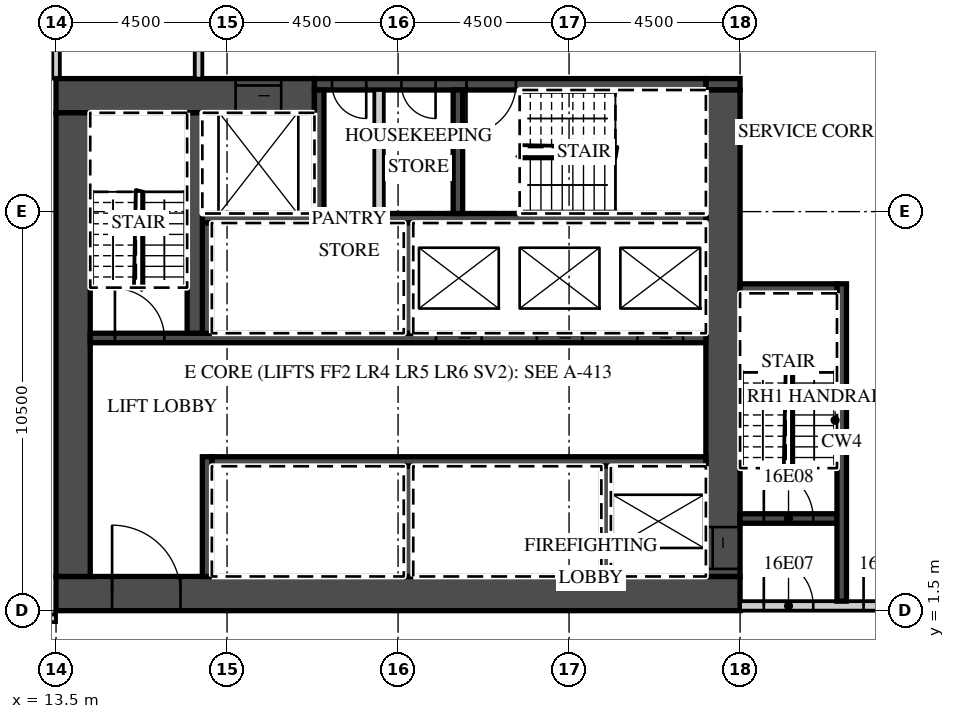
"""IFC4 building model, lengths in metres.
Left out: names, types, materials, properties, quantities, classifications, styles, units other than length and angle.
Written with IfcOpenShell. Run it as: python <this file> out.ifc"""

import sys

from ifc_helpers import new_model, si_unit, direction, frame, frame_2d, origin, place, context, subcontext, project, spatial, rectangle, extrude, element, fill, save


model = new_model("IFC4")
c1 = context("Model", 3, precision=1e-05, world=origin(), true_north=direction((0.0, 1.0)))
c2 = subcontext(c1, "Body", "Model", "MODEL_VIEW")
j1 = project(units=[si_unit("LENGTHUNIT", "METRE"), si_unit("PLANEANGLEUNIT", "RADIAN")], contexts=[c1])
p1 = place(None, origin())
s1 = spatial("IfcSite", under=j1, at=p1, CompositionType="ELEMENT")
p2 = place(p1, origin())
s2 = spatial("IfcBuilding", under=s1, at=p2, CompositionType="ELEMENT")
p3 = place(p2, frame((0.0, 0.0, 83.1)))
s3 = spatial("IfcBuildingStorey", under=s2, at=p3, CompositionType="ELEMENT", Elevation=83.1)
p4 = place(p3, frame((13.5, 15.5, 0.0), z_axis=(0.0, 0.0, 1.0), x_axis=(0.0, 1.0, 0.0)))
e1 = element("IfcWall", 1, at=p4, inside=s3, PredefinedType="PARTITIONING", context=c2, shape_type="SweptSolid", body=[
    extrude(rectangle(XDim=6.05, YDim=0.2, at=frame_2d((3.025, 0.0))), origin(), (0.0, 0.0, 1.0), 3.02),
])
p5 = place(p3, frame((-44.55, 1.3, 0.0), z_axis=(0.0, 0.0, 1.0), x_axis=(1.0, 0.0, 0.0)))
e2 = element("IfcWall", 2, at=p5, inside=s3, PredefinedType="PARTITIONING", context=c2, shape_type="SweptSolid", body=[
    extrude(rectangle(XDim=58.05, YDim=0.2, at=frame_2d((29.025, 0.0))), origin(), (0.0, 0.0, 1.0), 3.02),
])
p6 = place(p5, frame((0.525, 0.0, 0.0)))
e3 = element("IfcOpeningElement", 3, at=p6, cuts=e2, PredefinedType="OPENING", context=c2, shape_type="SweptSolid", body=[
    extrude(rectangle(XDim=1.0, YDim=2.1, at=frame_2d((0.5, 1.05))), frame((0.0, 0.11, 0.0), z_axis=(0.0, -1.0, 0.0), x_axis=(1.0, 0.0, 0.0)), (0.0, 0.0, 1.0), 0.22),
])
p7 = place(p5, frame((4.625, 0.0, 0.0)))
e4 = element("IfcOpeningElement", 4, at=p7, cuts=e2, PredefinedType="OPENING", context=c2, shape_type="SweptSolid", body=[
    extrude(rectangle(XDim=1.0, YDim=2.1, at=frame_2d((0.5, 1.05))), frame((0.0, 0.11, 0.0), z_axis=(0.0, -1.0, 0.0), x_axis=(1.0, 0.0, 0.0)), (0.0, 0.0, 1.0), 0.22),
])
p8 = place(p5, frame((10.987, 0.0, 0.0)))
e5 = element("IfcOpeningElement", 5, at=p8, cuts=e2, PredefinedType="OPENING", context=c2, shape_type="SweptSolid", body=[
    extrude(rectangle(XDim=1.2, YDim=2.1, at=frame_2d((0.6, 1.05))), frame((0.0, 0.11, 0.0), z_axis=(0.0, -1.0, 0.0), x_axis=(1.0, 0.0, 0.0)), (0.0, 0.0, 1.0), 0.22),
])
p9 = place(p5, frame((19.987, 0.0, 0.0)))
e6 = element("IfcOpeningElement", 6, at=p9, cuts=e2, PredefinedType="OPENING", context=c2, shape_type="SweptSolid", body=[
    extrude(rectangle(XDim=1.2, YDim=2.1, at=frame_2d((0.6, 1.05))), frame((0.0, 0.11, 0.0), z_axis=(0.0, -1.0, 0.0), x_axis=(1.0, 0.0, 0.0)), (0.0, 0.0, 1.0), 0.22),
])
p10 = place(p5, frame((28.987, 0.0, 0.0)))
e7 = element("IfcOpeningElement", 7, at=p10, cuts=e2, PredefinedType="OPENING", context=c2, shape_type="SweptSolid", body=[
    extrude(rectangle(XDim=1.2, YDim=2.1, at=frame_2d((0.6, 1.05))), frame((0.0, 0.11, 0.0), z_axis=(0.0, -1.0, 0.0), x_axis=(1.0, 0.0, 0.0)), (0.0, 0.0, 1.0), 0.22),
])
p11 = place(p5, frame((36.125, 0.0, 0.0)))
e8 = element("IfcOpeningElement", 8, at=p11, cuts=e2, PredefinedType="OPENING", context=c2, shape_type="SweptSolid", body=[
    extrude(rectangle(XDim=1.0, YDim=2.1, at=frame_2d((0.5, 1.05))), frame((0.0, 0.11, 0.0), z_axis=(0.0, -1.0, 0.0), x_axis=(1.0, 0.0, 0.0)), (0.0, 0.0, 1.0), 0.22),
])
p12 = place(p5, frame((42.975, 0.0, 0.0)))
e9 = element("IfcOpeningElement", 9, at=p12, cuts=e2, PredefinedType="OPENING", context=c2, shape_type="SweptSolid", body=[
    extrude(rectangle(XDim=1.0, YDim=2.1, at=frame_2d((0.5, 1.05))), frame((0.0, 0.11, 0.0), z_axis=(0.0, -1.0, 0.0), x_axis=(1.0, 0.0, 0.0)), (0.0, 0.0, 1.0), 0.22),
])
p13 = place(p5, frame((46.987, 0.0, 0.0)))
e10 = element("IfcOpeningElement", 10, at=p13, cuts=e2, PredefinedType="OPENING", context=c2, shape_type="SweptSolid", body=[
    extrude(rectangle(XDim=1.2, YDim=2.1, at=frame_2d((0.6, 1.05))), frame((0.0, 0.11, 0.0), z_axis=(0.0, -1.0, 0.0), x_axis=(1.0, 0.0, 0.0)), (0.0, 0.0, 1.0), 0.22),
])
p14 = place(p5, frame((56.475, 0.0, 0.0)))
e11 = element("IfcOpeningElement", 11, at=p14, cuts=e2, PredefinedType="OPENING", context=c2, shape_type="SweptSolid", body=[
    extrude(rectangle(XDim=1.0, YDim=2.1, at=frame_2d((0.5, 1.05))), frame((0.0, 0.11, 0.0), z_axis=(0.0, -1.0, 0.0), x_axis=(1.0, 0.0, 0.0)), (0.0, 0.0, 1.0), 0.22),
])
p15 = place(p3, frame((13.5, 1.95, 0.0), z_axis=(0.0, 0.0, 1.0), x_axis=(1.0, 0.0, 0.0)))
e12 = element("IfcWall", 12, at=p15, inside=s3, PredefinedType="SHEAR", context=c2, shape_type="SweptSolid", body=[
    extrude(rectangle(XDim=18.0, YDim=0.9, at=frame_2d((9.0, 0.0))), origin(), (0.0, 0.0, 1.0), 3.02),
])
p16 = place(p15, frame((1.475, 0.0, 0.0)))
e13 = element("IfcOpeningElement", 13, at=p16, cuts=e12, PredefinedType="OPENING", context=c2, shape_type="SweptSolid", body=[
    extrude(rectangle(XDim=1.8, YDim=2.1, at=frame_2d((0.9, 1.05))), frame((0.0, 0.46, 0.0), z_axis=(0.0, -1.0, 0.0), x_axis=(1.0, 0.0, 0.0)), (0.0, 0.0, 1.0), 0.92),
])
p17 = place(p3, frame((13.5, 15.05, 0.0), z_axis=(0.0, 0.0, 1.0), x_axis=(1.0, 0.0, 0.0)))
e14 = element("IfcWall", 14, at=p17, inside=s3, PredefinedType="SHEAR", context=c2, shape_type="SweptSolid", body=[
    extrude(rectangle(XDim=6.8, YDim=0.9, at=frame_2d((3.4, 0.0))), origin(), (0.0, 0.0, 1.0), 3.02),
])
p18 = place(p17, frame((4.725, 0.0, 0.0)))
e15 = element("IfcOpeningElement", 15, at=p18, cuts=e14, PredefinedType="OPENING", context=c2, shape_type="SweptSolid", body=[
    extrude(rectangle(XDim=1.2, YDim=2.1, at=frame_2d((0.6, 1.05))), frame((0.0, 0.46, 0.0), z_axis=(0.0, -1.0, 0.0), x_axis=(1.0, 0.0, 0.0)), (0.0, 0.0, 1.0), 0.92),
])
p19 = place(p3, frame((30.6, 15.35, 0.0), z_axis=(0.0, 0.0, 1.0), x_axis=(1.0, 0.0, 0.0)))
e16 = element("IfcWall", 16, at=p19, inside=s3, PredefinedType="SHEAR", context=c2, shape_type="SweptSolid", body=[
    extrude(rectangle(XDim=0.9, YDim=0.3, at=frame_2d((0.45, 0.0))), origin(), (0.0, 0.0, 1.0), 3.02),
])
p20 = place(p3, frame((20.3, 15.35, 0.0), z_axis=(0.0, 0.0, 1.0), x_axis=(1.0, 0.0, 0.0)))
e17 = element("IfcWall", 17, at=p20, inside=s3, PredefinedType="SHEAR", context=c2, shape_type="SweptSolid", body=[
    extrude(rectangle(XDim=10.3, YDim=0.3, at=frame_2d((5.15, 0.0))), origin(), (0.0, 0.0, 1.0), 3.02),
])
p21 = place(p20, frame((4.0, 0.0, 0.0)))
e18 = element("IfcOpeningElement", 18, at=p21, cuts=e17, PredefinedType="OPENING", context=c2, shape_type="SweptSolid", body=[
    extrude(rectangle(XDim=1.3, YDim=2.1, at=frame_2d((0.65, 1.05))), frame((0.0, 0.16, 0.0), z_axis=(0.0, -1.0, 0.0), x_axis=(1.0, 0.0, 0.0)), (0.0, 0.0, 1.0), 0.32),
])
p22 = place(p20, frame((2.288, 0.0, 0.0)))
e19 = element("IfcOpeningElement", 19, at=p22, cuts=e17, PredefinedType="OPENING", context=c2, shape_type="SweptSolid", body=[
    extrude(rectangle(XDim=0.9, YDim=2.1, at=frame_2d((0.45, 1.05))), frame((0.0, 0.16, 0.0), z_axis=(0.0, -1.0, 0.0), x_axis=(1.0, 0.0, 0.0)), (0.0, 0.0, 1.0), 0.32),
])
p23 = place(p20, frame((0.462, 0.0, 0.0)))
e20 = element("IfcOpeningElement", 20, at=p23, cuts=e17, PredefinedType="OPENING", context=c2, shape_type="SweptSolid", body=[
    extrude(rectangle(XDim=0.9, YDim=2.1, at=frame_2d((0.45, 1.05))), frame((0.0, 0.16, 0.0), z_axis=(0.0, -1.0, 0.0), x_axis=(1.0, 0.0, 0.0)), (0.0, 0.0, 1.0), 0.32),
])
p24 = place(p3, frame((31.05, 2.4, 0.0), z_axis=(0.0, 0.0, 1.0), x_axis=(0.0, 1.0, 0.0)))
e21 = element("IfcWall", 21, at=p24, inside=s3, PredefinedType="SHEAR", context=c2, shape_type="SweptSolid", body=[
    extrude(rectangle(XDim=12.8, YDim=0.9, at=frame_2d((6.4, 0.0))), origin(), (0.0, 0.0, 1.0), 3.02),
])
p25 = place(p24, frame((0.2, 0.0, 0.0)))
e22 = element("IfcOpeningElement", 22, at=p25, cuts=e21, PredefinedType="OPENING", context=c2, shape_type="SweptSolid", body=[
    extrude(rectangle(XDim=1.1, YDim=2.1, at=frame_2d((0.55, 1.05))), frame((0.0, 0.46, 0.0), z_axis=(0.0, -1.0, 0.0), x_axis=(1.0, 0.0, 0.0)), (0.0, 0.0, 1.0), 0.92),
])
p26 = place(p3, frame((13.95, 2.4, 0.0), z_axis=(0.0, 0.0, 1.0), x_axis=(0.0, 1.0, 0.0)))
e23 = element("IfcWall", 23, at=p26, inside=s3, PredefinedType="SHEAR", context=c2, shape_type="SweptSolid", body=[
    extrude(rectangle(XDim=12.2, YDim=0.9, at=frame_2d((6.1, 0.0))), origin(), (0.0, 0.0, 1.0), 3.02),
])
p27 = place(p3, frame((17.6, 5.425, 0.0), z_axis=(0.0, 0.0, 1.0), x_axis=(1.0, 0.0, 0.0)))
e24 = element("IfcWall", 24, at=p27, inside=s3, PredefinedType="SHEAR", context=c2, shape_type="SweptSolid", body=[
    extrude(rectangle(XDim=13.0, YDim=0.25, at=frame_2d((6.5, 0.0))), origin(), (0.0, 0.0, 1.0), 3.02),
])
p28 = place(p3, frame((17.475, 2.4, 0.0), z_axis=(0.0, 0.0, 1.0), x_axis=(0.0, 1.0, 0.0)))
e25 = element("IfcWall", 25, at=p28, inside=s3, PredefinedType="SHEAR", context=c2, shape_type="SweptSolid", body=[
    extrude(rectangle(XDim=3.15, YDim=0.25, at=frame_2d((1.575, 0.0))), origin(), (0.0, 0.0, 1.0), 3.02),
])
for number, where, z_axis, x_axis in (
    (26, (27.975, 2.4, 0.0), (0.0, 0.0, 1.0), (0.0, 1.0, 0.0)),
    (27, (22.775, 2.4, 0.0), (0.0, 0.0, 1.0), (0.0, 1.0, 0.0)),
):
    element("IfcWall", number, at=place(p3, frame(where, z_axis=z_axis, x_axis=x_axis)), inside=s3, PredefinedType="SHEAR", context=c2, shape_type="SweptSolid", body=[
        extrude(rectangle(XDim=2.9, YDim=0.25, at=frame_2d((1.45, 0.0))), origin(), (0.0, 0.0, 1.0), 3.02),
    ])
p29 = place(p3, frame((14.4, 8.675, 0.0), z_axis=(0.0, 0.0, 1.0), x_axis=(1.0, 0.0, 0.0)))
e28 = element("IfcWall", 28, at=p29, inside=s3, PredefinedType="SHEAR", context=c2, shape_type="SweptSolid", body=[
    extrude(rectangle(XDim=16.2, YDim=0.25, at=frame_2d((8.1, 0.0))), origin(), (0.0, 0.0, 1.0), 3.02),
])
p30 = place(p29, frame((14.4, 0.0, 0.0)))
e29 = element("IfcOpeningElement", 29, at=p30, cuts=e28, PredefinedType="OPENING", context=c2, shape_type="SweptSolid", body=[
    extrude(rectangle(XDim=1.2, YDim=2.1, at=frame_2d((0.6, 1.05))), frame((0.0, 0.135, 0.0), z_axis=(0.0, -1.0, 0.0), x_axis=(1.0, 0.0, 0.0)), (0.0, 0.0, 1.0), 0.27),
])
p31 = place(p29, frame((11.75, 0.0, 0.0)))
e30 = element("IfcOpeningElement", 30, at=p31, cuts=e28, PredefinedType="OPENING", context=c2, shape_type="SweptSolid", body=[
    extrude(rectangle(XDim=1.2, YDim=2.1, at=frame_2d((0.6, 1.05))), frame((0.0, 0.135, 0.0), z_axis=(0.0, -1.0, 0.0), x_axis=(1.0, 0.0, 0.0)), (0.0, 0.0, 1.0), 0.27),
])
p32 = place(p29, frame((9.1, 0.0, 0.0)))
e31 = element("IfcOpeningElement", 31, at=p32, cuts=e28, PredefinedType="OPENING", context=c2, shape_type="SweptSolid", body=[
    extrude(rectangle(XDim=1.2, YDim=2.1, at=frame_2d((0.6, 1.05))), frame((0.0, 0.135, 0.0), z_axis=(0.0, -1.0, 0.0), x_axis=(1.0, 0.0, 0.0)), (0.0, 0.0, 1.0), 0.27),
])
p33 = place(p29, frame((0.65, 0.0, 0.0)))
e32 = element("IfcOpeningElement", 32, at=p33, cuts=e28, PredefinedType="OPENING", context=c2, shape_type="SweptSolid", body=[
    extrude(rectangle(XDim=1.3, YDim=2.1, at=frame_2d((0.65, 1.05))), frame((0.0, 0.135, 0.0), z_axis=(0.0, -1.0, 0.0), x_axis=(1.0, 0.0, 0.0)), (0.0, 0.0, 1.0), 0.27),
])
p34 = place(p3, frame((17.35, 11.825, 0.0), z_axis=(0.0, 0.0, 1.0), x_axis=(1.0, 0.0, 0.0)))
e33 = element("IfcWall", 33, at=p34, inside=s3, PredefinedType="SHEAR", context=c2, shape_type="SweptSolid", body=[
    extrude(rectangle(XDim=13.25, YDim=0.25, at=frame_2d((6.625, 0.0))), origin(), (0.0, 0.0, 1.0), 3.02),
])
for number, where, z_axis, x_axis in (
    (34, (17.475, 8.8, 0.0), (0.0, 0.0, 1.0), (0.0, 1.0, 0.0)),
    (35, (22.775, 8.8, 0.0), (0.0, 0.0, 1.0), (0.0, 1.0, 0.0)),
):
    element("IfcWall", number, at=place(p3, frame(where, z_axis=z_axis, x_axis=x_axis)), inside=s3, PredefinedType="SHEAR", context=c2, shape_type="SweptSolid", body=[
        extrude(rectangle(XDim=2.9, YDim=0.25, at=frame_2d((1.45, 0.0))), origin(), (0.0, 0.0, 1.0), 3.02),
    ])
p35 = place(p3, frame((17.15, 8.8, 0.0), z_axis=(0.0, 0.0, 1.0), x_axis=(0.0, 1.0, 0.0)))
e36 = element("IfcWall", 36, at=p35, inside=s3, PredefinedType="SHEAR", context=c2, shape_type="SweptSolid", body=[
    extrude(rectangle(XDim=5.8, YDim=0.4, at=frame_2d((2.9, 0.0))), origin(), (0.0, 0.0, 1.0), 3.02),
])
for number, where, z_axis, x_axis in (
    (37, (20.425, 11.95, 0.0), (0.0, 0.0, 1.0), (0.0, 1.0, 0.0)),
    (38, (24.075, 11.95, 0.0), (0.0, 0.0, 1.0), (0.0, 1.0, 0.0)),
):
    element("IfcWall", number, at=place(p3, frame(where, z_axis=z_axis, x_axis=x_axis)), inside=s3, PredefinedType="SHEAR", context=c2, shape_type="SweptSolid", body=[
        extrude(rectangle(XDim=3.25, YDim=0.25, at=frame_2d((1.625, 0.0))), origin(), (0.0, 0.0, 1.0), 3.02),
    ])
p36 = place(p3, frame((22.0, 11.95, 0.0), z_axis=(0.0, 0.0, 1.0), x_axis=(0.0, 1.0, 0.0)))
e39 = element("IfcWall", 39, at=p36, inside=s3, PredefinedType="PARTITIONING", context=c2, shape_type="SweptSolid", body=[
    extrude(rectangle(XDim=3.25, YDim=0.25, at=frame_2d((1.625, 0.0))), origin(), (0.0, 0.0, 1.0), 3.02),
])
p37 = place(p3, frame((31.5, 1.625, 0.0), z_axis=(0.0, 0.0, 1.0), x_axis=(1.0, 0.0, 0.0)))
e40 = element("IfcWall", 40, at=p37, inside=s3, PredefinedType="PARTITIONING", context=c2, shape_type="SweptSolid", body=[
    extrude(rectangle(XDim=13.05, YDim=0.25, at=frame_2d((6.525, 0.0))), origin(), (0.0, 0.0, 1.0), 3.02),
])
p38 = place(p37, frame((0.625, 0.0, 0.0)))
e41 = element("IfcOpeningElement", 41, at=p38, cuts=e40, PredefinedType="OPENING", context=c2, shape_type="SweptSolid", body=[
    extrude(rectangle(XDim=1.3, YDim=2.1, at=frame_2d((0.65, 1.05))), frame((0.0, 0.135, 0.0), z_axis=(0.0, -1.0, 0.0), x_axis=(1.0, 0.0, 0.0)), (0.0, 0.0, 1.0), 0.27),
])
p39 = place(p37, frame((3.25, 0.0, 0.0)))
e42 = element("IfcOpeningElement", 42, at=p39, cuts=e40, PredefinedType="OPENING", context=c2, shape_type="SweptSolid", body=[
    extrude(rectangle(XDim=1.1, YDim=2.1, at=frame_2d((0.55, 1.05))), frame((0.0, 0.135, 0.0), z_axis=(0.0, -1.0, 0.0), x_axis=(1.0, 0.0, 0.0)), (0.0, 0.0, 1.0), 0.27),
])
p40 = place(p3, frame((31.5, 3.925, 0.0), z_axis=(0.0, 0.0, 1.0), x_axis=(1.0, 0.0, 0.0)))
e43 = element("IfcWall", 43, at=p40, inside=s3, PredefinedType="SHEAR", context=c2, shape_type="SweptSolid", body=[
    extrude(rectangle(XDim=2.55, YDim=0.25, at=frame_2d((1.275, 0.0))), origin(), (0.0, 0.0, 1.0), 3.02),
])
p41 = place(p40, frame((0.625, 0.0, 0.0)))
e44 = element("IfcOpeningElement", 44, at=p41, cuts=e43, PredefinedType="OPENING", context=c2, shape_type="SweptSolid", body=[
    extrude(rectangle(XDim=1.3, YDim=2.1, at=frame_2d((0.65, 1.05))), frame((0.0, 0.135, 0.0), z_axis=(0.0, -1.0, 0.0), x_axis=(1.0, 0.0, 0.0)), (0.0, 0.0, 1.0), 0.27),
])
p42 = place(p3, frame((34.175, 1.75, 0.0), z_axis=(0.0, 0.0, 1.0), x_axis=(0.0, 1.0, 0.0)))
e45 = element("IfcWall", 45, at=p42, inside=s3, PredefinedType="SHEAR", context=c2, shape_type="SweptSolid", body=[
    extrude(rectangle(XDim=8.35, YDim=0.25, at=frame_2d((4.175, 0.0))), origin(), (0.0, 0.0, 1.0), 3.02),
])
p43 = place(p3, frame((31.5, 9.975, 0.0), z_axis=(0.0, 0.0, 1.0), x_axis=(1.0, 0.0, 0.0)))
e46 = element("IfcWall", 46, at=p43, inside=s3, PredefinedType="SHEAR", context=c2, shape_type="SweptSolid", body=[
    extrude(rectangle(XDim=2.55, YDim=0.25, at=frame_2d((1.275, 0.0))), origin(), (0.0, 0.0, 1.0), 3.02),
])
p44 = place(p3, frame((17.25, 15.5, 0.0), z_axis=(0.0, 0.0, 1.0), x_axis=(0.0, 1.0, 0.0)))
e47 = element("IfcWall", 47, at=p44, inside=s3, PredefinedType="PARTITIONING", context=c2, shape_type="SweptSolid", body=[
    extrude(rectangle(XDim=2.2, YDim=0.2, at=frame_2d((1.1, 0.0))), origin(), (0.0, 0.0, 1.0), 3.02),
])
p45 = place(p30, origin())
e48 = element("IfcDoor", 48, at=p45, inside=s3, OperationType="SLIDING_TO_LEFT", PredefinedType="DOOR", context=c2, shape_type="SweptSolid", body=[
    extrude(rectangle(XDim=1.2, YDim=2.1, at=frame_2d((0.6, 1.05))), frame((0.0, 0.025, 0.0), z_axis=(0.0, -1.0, 0.0), x_axis=(1.0, 0.0, 0.0)), (0.0, 0.0, 1.0), 0.05),
])
fill(e29, e48)
p46 = place(p31, origin())
e49 = element("IfcDoor", 49, at=p46, inside=s3, OperationType="SLIDING_TO_RIGHT", PredefinedType="DOOR", context=c2, shape_type="SweptSolid", body=[
    extrude(rectangle(XDim=1.2, YDim=2.1, at=frame_2d((0.6, 1.05))), frame((0.0, 0.025, 0.0), z_axis=(0.0, -1.0, 0.0), x_axis=(1.0, 0.0, 0.0)), (0.0, 0.0, 1.0), 0.05),
])
fill(e30, e49)
p47 = place(p32, origin())
e50 = element("IfcDoor", 50, at=p47, inside=s3, OperationType="SLIDING_TO_RIGHT", PredefinedType="DOOR", context=c2, shape_type="SweptSolid", body=[
    extrude(rectangle(XDim=1.2, YDim=2.1, at=frame_2d((0.6, 1.05))), frame((0.0, 0.025, 0.0), z_axis=(0.0, -1.0, 0.0), x_axis=(1.0, 0.0, 0.0)), (0.0, 0.0, 1.0), 0.05),
])
fill(e31, e50)
p48 = place(p18, origin())
e51 = element("IfcDoor", 51, at=p48, inside=s3, OperationType="SLIDING_TO_LEFT", PredefinedType="DOOR", context=c2, shape_type="SweptSolid", body=[
    extrude(rectangle(XDim=1.2, YDim=2.1, at=frame_2d((0.6, 1.05))), frame((0.0, 0.025, 0.0), z_axis=(0.0, -1.0, 0.0), x_axis=(1.0, 0.0, 0.0)), (0.0, 0.0, 1.0), 0.05),
])
fill(e15, e51)
p49 = place(p25, origin())
e52 = element("IfcDoor", 52, at=p49, inside=s3, OperationType="SLIDING_TO_LEFT", PredefinedType="DOOR", context=c2, shape_type="SweptSolid", body=[
    extrude(rectangle(XDim=1.1, YDim=2.1, at=frame_2d((0.55, 1.05))), frame((0.0, 0.025, 0.0), z_axis=(0.0, -1.0, 0.0), x_axis=(1.0, 0.0, 0.0)), (0.0, 0.0, 1.0), 0.05),
])
fill(e22, e52)
p50 = place(p16, origin())
e53 = element("IfcDoor", 53, at=p50, inside=s3, OperationType="DOUBLE_DOOR_DOUBLE_SWING", PredefinedType="DOOR", context=c2, shape_type="SweptSolid", body=[
    extrude(rectangle(XDim=1.8, YDim=2.1, at=frame_2d((0.9, 1.05))), frame((0.0, 0.025, 0.0), z_axis=(0.0, -1.0, 0.0), x_axis=(1.0, 0.0, 0.0)), (0.0, 0.0, 1.0), 0.05),
])
fill(e13, e53)
p51 = place(p38, origin())
e54 = element("IfcDoor", 54, at=p51, inside=s3, OperationType="SINGLE_SWING_LEFT", PredefinedType="DOOR", context=c2, shape_type="SweptSolid", body=[
    extrude(rectangle(XDim=1.3, YDim=2.1, at=frame_2d((0.65, 1.05))), frame((0.0, 0.025, 0.0), z_axis=(0.0, -1.0, 0.0), x_axis=(1.0, 0.0, 0.0)), (0.0, 0.0, 1.0), 0.05),
])
fill(e41, e54)
p52 = place(p41, origin())
e55 = element("IfcDoor", 55, at=p52, inside=s3, OperationType="SINGLE_SWING_LEFT", PredefinedType="DOOR", context=c2, shape_type="SweptSolid", body=[
    extrude(rectangle(XDim=1.3, YDim=2.1, at=frame_2d((0.65, 1.05))), frame((0.0, 0.025, 0.0), z_axis=(0.0, -1.0, 0.0), x_axis=(1.0, 0.0, 0.0)), (0.0, 0.0, 1.0), 0.05),
])
fill(e44, e55)
p53 = place(p39, origin())
e56 = element("IfcDoor", 56, at=p53, inside=s3, OperationType="SINGLE_SWING_LEFT", PredefinedType="DOOR", context=c2, shape_type="SweptSolid", body=[
    extrude(rectangle(XDim=1.1, YDim=2.1, at=frame_2d((0.55, 1.05))), frame((0.0, 0.025, 0.0), z_axis=(0.0, -1.0, 0.0), x_axis=(1.0, 0.0, 0.0)), (0.0, 0.0, 1.0), 0.05),
])
fill(e42, e56)
p54 = place(p33, origin())
e57 = element("IfcDoor", 57, at=p54, inside=s3, OperationType="SINGLE_SWING_LEFT", PredefinedType="DOOR", context=c2, shape_type="SweptSolid", body=[
    extrude(rectangle(XDim=1.3, YDim=2.1, at=frame_2d((0.65, 1.05))), frame((0.0, 0.025, 0.0), z_axis=(0.0, -1.0, 0.0), x_axis=(1.0, 0.0, 0.0)), (0.0, 0.0, 1.0), 0.05),
])
fill(e32, e57)
p55 = place(p21, origin())
e58 = element("IfcDoor", 58, at=p55, inside=s3, OperationType="SINGLE_SWING_LEFT", PredefinedType="DOOR", context=c2, shape_type="SweptSolid", body=[
    extrude(rectangle(XDim=1.3, YDim=2.1, at=frame_2d((0.65, 1.05))), frame((0.0, 0.025, 0.0), z_axis=(0.0, -1.0, 0.0), x_axis=(1.0, 0.0, 0.0)), (0.0, 0.0, 1.0), 0.05),
])
fill(e18, e58)
p56 = place(p22, origin())
e59 = element("IfcDoor", 59, at=p56, inside=s3, OperationType="SINGLE_SWING_RIGHT", PredefinedType="DOOR", context=c2, shape_type="SweptSolid", body=[
    extrude(rectangle(XDim=0.9, YDim=2.1, at=frame_2d((0.45, 1.05))), frame((0.0, 0.025, 0.0), z_axis=(0.0, -1.0, 0.0), x_axis=(1.0, 0.0, 0.0)), (0.0, 0.0, 1.0), 0.05),
])
fill(e19, e59)
p57 = place(p23, origin())
e60 = element("IfcDoor", 60, at=p57, inside=s3, OperationType="SINGLE_SWING_RIGHT", PredefinedType="DOOR", context=c2, shape_type="SweptSolid", body=[
    extrude(rectangle(XDim=0.9, YDim=2.1, at=frame_2d((0.45, 1.05))), frame((0.0, 0.025, 0.0), z_axis=(0.0, -1.0, 0.0), x_axis=(1.0, 0.0, 0.0)), (0.0, 0.0, 1.0), 0.05),
])
fill(e20, e60)
save(model, sys.argv[1])
